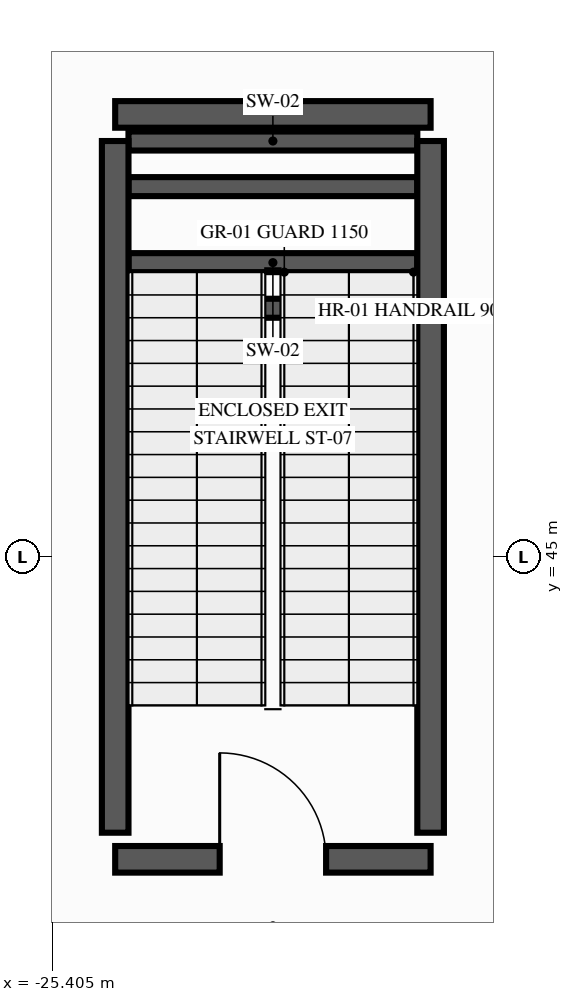
"""IFC4 building model, lengths in metres.
Left out: names, types, materials, properties, quantities, classifications, styles, units other than length and angle.
Written with IfcOpenShell. Run it as: python <this file> out.ifc"""

import sys

from ifc_helpers import new_model, si_unit, direction, frame, frame_2d, origin, place, context, subcontext, project, spatial, rectangle, extrude, element, fill, save


model = new_model("IFC4")
c1 = context("Model", 3, precision=1e-05, world=origin(), true_north=direction((0.0, 1.0)))
c2 = subcontext(c1, "Body", "Model", "MODEL_VIEW")
j1 = project(units=[si_unit("LENGTHUNIT", "METRE"), si_unit("PLANEANGLEUNIT", "RADIAN")], contexts=[c1])
p1 = place(None, origin())
s1 = spatial("IfcSite", under=j1, at=p1, CompositionType="ELEMENT")
p2 = place(p1, origin())
s2 = spatial("IfcBuilding", under=s1, at=p2, CompositionType="ELEMENT")
p3 = place(p2, frame((0.0, 0.0, -6.0)))
s3 = spatial("IfcBuildingStorey", under=s2, at=p3, CompositionType="ELEMENT", Elevation=-6.0)
for number, where, z_axis, x_axis in (
    (1, (-24.4, 48.875, 0.0), (0.0, 0.0, 1.0), (1.0, 0.0, 0.0)),
    (2, (-24.4, 50.475, 0.0), (0.0, 0.0, 1.0), (1.0, 0.0, 0.0)),
):
    element("IfcWall", number, at=place(p3, frame(where, z_axis=z_axis, x_axis=x_axis)), inside=s3, PredefinedType="SHEAR", context=c2, shape_type="SweptSolid", body=[
        extrude(rectangle(XDim=3.8, YDim=0.25, at=frame_2d((1.9, 0.0))), origin(), (0.0, 0.0, 1.0), 2.8),
    ])
for number, where, z_axis, x_axis in (
    (3, (-24.4, 48.275, 0.0), (0.0, 0.0, 1.0), (1.0, 0.0, 0.0)),
    (4, (-24.4, 49.875, 0.0), (0.0, 0.0, 1.0), (1.0, 0.0, 0.0)),
):
    element("IfcWall", number, at=place(p3, frame(where, z_axis=z_axis, x_axis=x_axis)), inside=s3, PredefinedType="SHEAR", context=c2, shape_type="SweptSolid", body=[
        extrude(rectangle(XDim=3.8, YDim=0.25, at=frame_2d((1.9, 0.0))), origin(), (0.0, 0.0, 1.0), 5.7),
    ])
p4 = place(p3, frame((-24.575, 41.025, 0.0), z_axis=(0.0, 0.0, 1.0), x_axis=(1.0, 0.0, 0.0)))
e5 = element("IfcWall", 5, at=p4, inside=s3, PredefinedType="SHEAR", context=c2, shape_type="SweptSolid", body=[
    extrude(rectangle(XDim=4.15, YDim=0.35, at=frame_2d((2.075, 0.0))), origin(), (0.0, 0.0, 1.0), 5.7),
])
p5 = place(p4, frame((1.375, 0.0, 0.0)))
e6 = element("IfcOpeningElement", 6, at=p5, cuts=e5, PredefinedType="OPENING", context=c2, shape_type="SweptSolid", body=[
    extrude(rectangle(XDim=1.4, YDim=2.2, at=frame_2d((0.7, 1.1))), frame((0.0, 0.185, 0.0), z_axis=(0.0, -1.0, 0.0), x_axis=(1.0, 0.0, 0.0)), (0.0, 0.0, 1.0), 0.37),
])
p6 = place(p3, frame((-24.575, 50.825, 0.0), z_axis=(0.0, 0.0, 1.0), x_axis=(1.0, 0.0, 0.0)))
e7 = element("IfcWall", 7, at=p6, inside=s3, PredefinedType="SHEAR", context=c2, shape_type="SweptSolid", body=[
    extrude(rectangle(XDim=4.15, YDim=0.35, at=frame_2d((2.075, 0.0))), origin(), (0.0, 0.0, 1.0), 5.7),
])
for number, where, z_axis, x_axis in (
    (8, (-24.575, 41.375, 0.0), (0.0, 0.0, 1.0), (0.0, 1.0, 0.0)),
    (9, (-20.425, 41.375, 0.0), (0.0, 0.0, 1.0), (0.0, 1.0, 0.0)),
):
    element("IfcWall", number, at=place(p3, frame(where, z_axis=z_axis, x_axis=x_axis)), inside=s3, PredefinedType="SHEAR", context=c2, shape_type="SweptSolid", body=[
        extrude(rectangle(XDim=9.1, YDim=0.35, at=frame_2d((4.55, 0.0))), origin(), (0.0, 0.0, 1.0), 5.7),
    ])
p7 = place(p5, origin())
e10 = element("IfcDoor", 10, at=p7, inside=s3, OperationType="SINGLE_SWING_LEFT", PredefinedType="DOOR", context=c2, shape_type="SweptSolid", body=[
    extrude(rectangle(XDim=1.4, YDim=2.2, at=frame_2d((0.7, 1.1))), frame((0.0, 0.025, 0.0), z_axis=(0.0, -1.0, 0.0), x_axis=(1.0, 0.0, 0.0)), (0.0, 0.0, 1.0), 0.05),
])
fill(e6, e10)
save(model, sys.argv[1])
